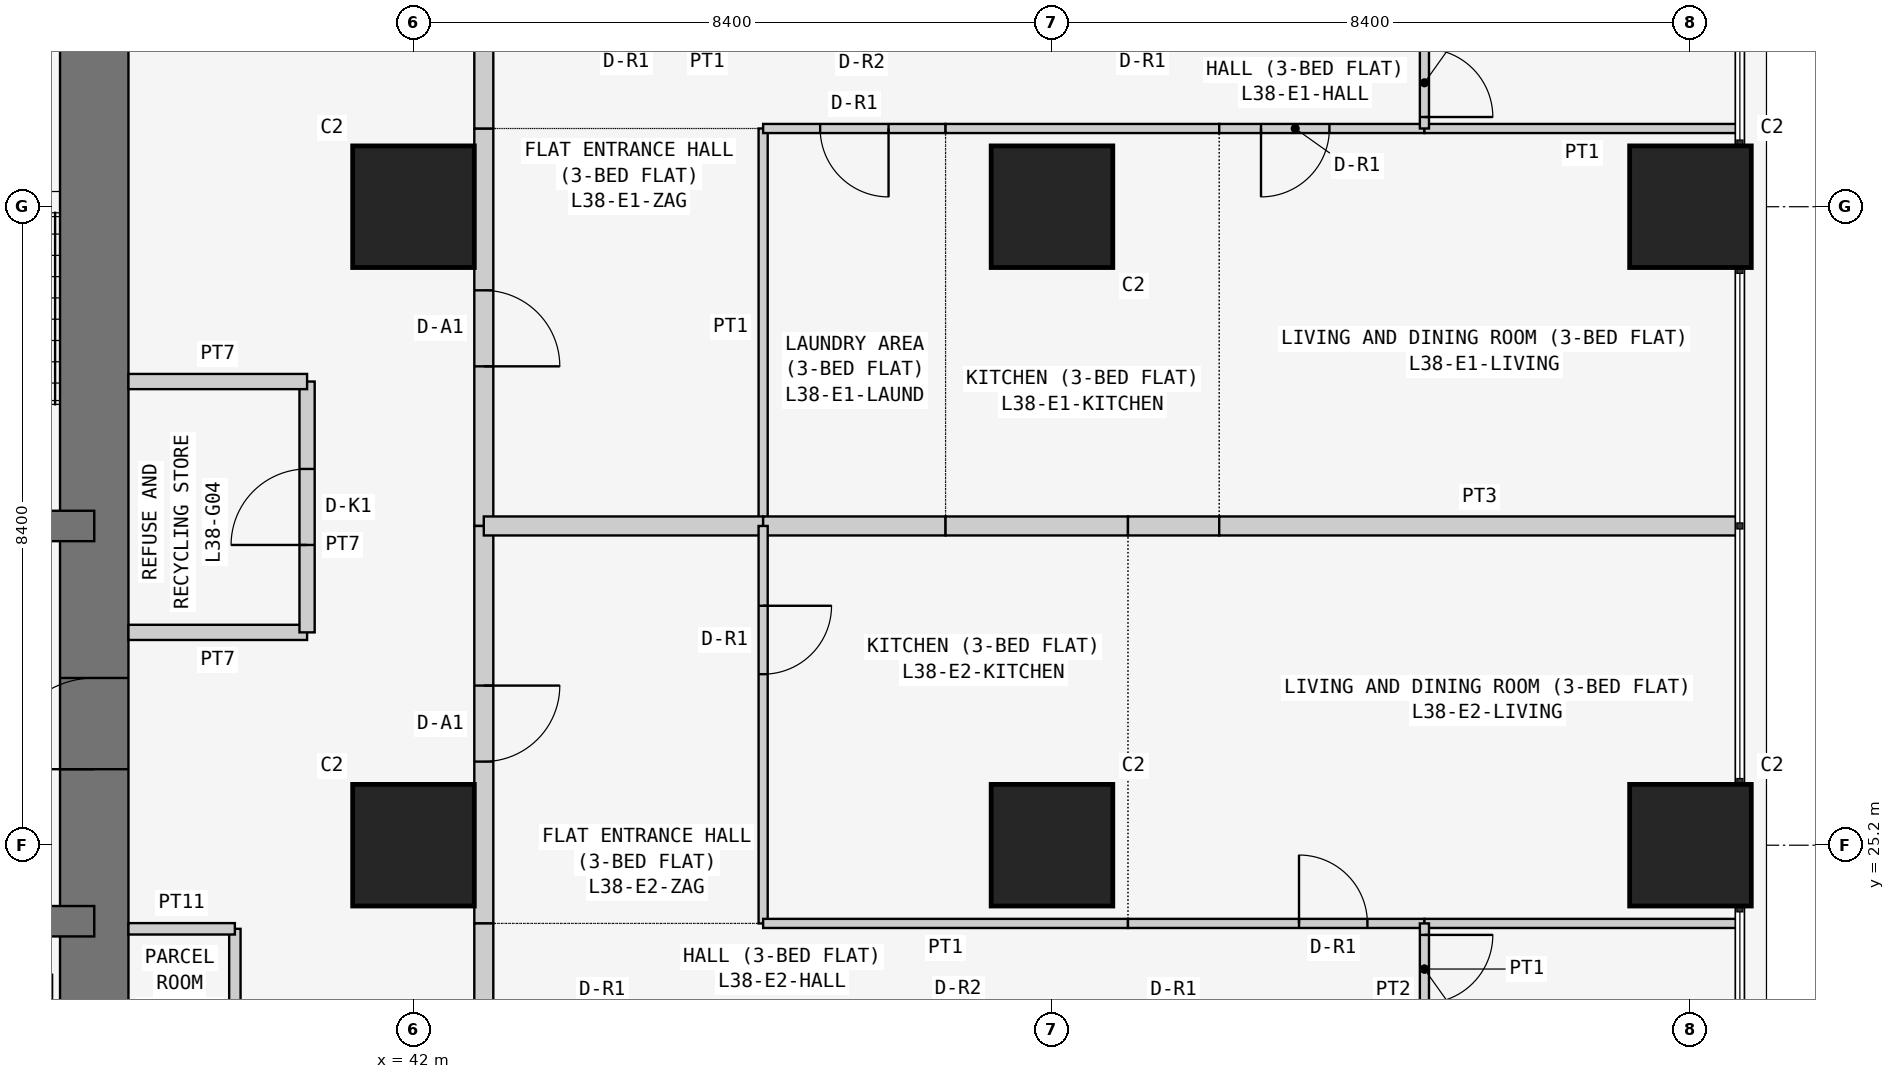
"""IFC4 building model, lengths in metres.
Left out: names, types, materials, properties, quantities, classifications, styles, units other than length and angle.
Written with IfcOpenShell. Run it as: python <this file> out.ifc"""

import sys

from ifc_helpers import new_model, si_unit, direction, frame, frame_2d, origin, origin_2d, place, context, subcontext, project, spatial, rectangle, extrude, element, fill, save


model = new_model("IFC4")
c1 = context("Model", 3, precision=1e-05, world=origin(), true_north=direction((0.0, 1.0)))
c2 = subcontext(c1, "Body", "Model", "MODEL_VIEW")
j1 = project(units=[si_unit("LENGTHUNIT", "METRE"), si_unit("PLANEANGLEUNIT", "RADIAN")], contexts=[c1])
p1 = place(None, origin())
s1 = spatial("IfcSite", under=j1, at=p1, CompositionType="ELEMENT")
p2 = place(p1, origin())
s2 = spatial("IfcBuilding", under=s1, at=p2, CompositionType="ELEMENT")
p3 = place(p2, frame((0.0, 0.0, 148.5)))
s3 = spatial("IfcBuildingStorey", under=s2, at=p3, CompositionType="ELEMENT", Elevation=148.5)
for number, where, z_axis, x_axis in (
    (1, (42.0, 25.2, 0.0), (0.0, 0.0, 1.0), (1.0, 0.0, 0.0)),
    (2, (42.0, 33.6, 0.0), (0.0, 0.0, 1.0), (1.0, 0.0, 0.0)),
    (3, (50.4, 25.2, 0.0), (0.0, 0.0, 1.0), (1.0, 0.0, 0.0)),
    (4, (50.4, 33.6, 0.0), (0.0, 0.0, 1.0), (1.0, 0.0, 0.0)),
    (5, (58.8, 25.2, 0.0), (0.0, 0.0, 1.0), (1.0, 0.0, 0.0)),
    (6, (58.8, 33.6, 0.0), (0.0, 0.0, 1.0), (1.0, 0.0, 0.0)),
):
    element("IfcColumn", number, at=place(p3, frame(where, z_axis=z_axis, x_axis=x_axis)), inside=s3, PredefinedType="COLUMN", context=c2, shape_type="SweptSolid", body=[
        extrude(rectangle(XDim=1.6, YDim=1.6, at=origin_2d()), origin(), (0.0, 0.0, 1.0), 3.6),
    ])
p4 = place(p3, frame((37.8, 21.0, 0.0), z_axis=(0.0, 0.0, 1.0), x_axis=(0.0, 1.0, 0.0)))
e7 = element("IfcWall", 7, at=p4, inside=s3, PredefinedType="SHEAR", context=c2, shape_type="SweptSolid", body=[
    extrude(rectangle(XDim=17.25, YDim=0.9, at=frame_2d((8.625, 0.0))), origin(), (0.0, 0.0, 1.0), 3.6),
])
p5 = place(p4, frame((5.2, 0.0, 0.0)))
e8 = element("IfcOpeningElement", 8, at=p5, cuts=e7, PredefinedType="OPENING", context=c2, shape_type="SweptSolid", body=[
    extrude(rectangle(XDim=1.2, YDim=2.1, at=frame_2d((0.6, 1.05))), frame((0.0, 0.46, 0.0), z_axis=(0.0, -1.0, 0.0), x_axis=(1.0, 0.0, 0.0)), (0.0, 0.0, 1.0), 0.92),
])
p6 = place(p3, frame((26.6, 24.2, 0.0), z_axis=(0.0, 0.0, 1.0), x_axis=(1.0, 0.0, 0.0)))
e9 = element("IfcWall", 9, at=p6, inside=s3, PredefinedType="SHEAR", context=c2, shape_type="SweptSolid", body=[
    extrude(rectangle(XDim=11.2, YDim=0.4, at=frame_2d((5.6, 0.0))), origin(), (0.0, 0.0, 1.0), 3.6),
])
p7 = place(p6, frame((0.85, 0.0, 0.0)))
e10 = element("IfcOpeningElement", 10, at=p7, cuts=e9, PredefinedType="OPENING", context=c2, shape_type="SweptSolid", body=[
    extrude(rectangle(XDim=1.1, YDim=2.1, at=frame_2d((0.55, 1.05))), frame((0.0, 0.21, 0.0), z_axis=(0.0, -1.0, 0.0), x_axis=(1.0, 0.0, 0.0)), (0.0, 0.0, 1.0), 0.42),
])
p8 = place(p6, frame((3.65, 0.0, 0.0)))
e11 = element("IfcOpeningElement", 11, at=p8, cuts=e9, PredefinedType="OPENING", context=c2, shape_type="SweptSolid", body=[
    extrude(rectangle(XDim=1.1, YDim=2.1, at=frame_2d((0.55, 1.05))), frame((0.0, 0.21, 0.0), z_axis=(0.0, -1.0, 0.0), x_axis=(1.0, 0.0, 0.0)), (0.0, 0.0, 1.0), 0.42),
])
p9 = place(p3, frame((32.2, 29.4, 0.0), z_axis=(0.0, 0.0, 1.0), x_axis=(1.0, 0.0, 0.0)))
e12 = element("IfcWall", 12, at=p9, inside=s3, PredefinedType="SHEAR", context=c2, shape_type="SweptSolid", body=[
    extrude(rectangle(XDim=5.6, YDim=0.4, at=frame_2d((2.8, 0.0))), origin(), (0.0, 0.0, 1.0), 3.6),
])
p10 = place(p9, frame((2.0, 0.0, 0.0)))
e13 = element("IfcOpeningElement", 13, at=p10, cuts=e12, PredefinedType="OPENING", context=c2, shape_type="SweptSolid", body=[
    extrude(rectangle(XDim=1.2, YDim=2.1, at=frame_2d((0.6, 1.05))), frame((0.0, 0.21, 0.0), z_axis=(0.0, -1.0, 0.0), x_axis=(1.0, 0.0, 0.0)), (0.0, 0.0, 1.0), 0.42),
])
p11 = place(p3, frame((39.65, 20.55, 0.0), z_axis=(0.0, 0.0, 1.0), x_axis=(0.0, 1.0, 0.0)))
e14 = element("IfcWall", 14, at=p11, inside=s3, PredefinedType="PARTITIONING", context=c2, shape_type="SweptSolid", body=[
    extrude(rectangle(XDim=3.55, YDim=0.15, at=frame_2d((1.775, 0.0))), origin(), (0.0, 0.0, 1.0), 3.45),
])
p12 = place(p11, frame((1.275, 0.0, 0.0)))
e15 = element("IfcOpeningElement", 15, at=p12, cuts=e14, PredefinedType="OPENING", context=c2, shape_type="SweptSolid", body=[
    extrude(rectangle(XDim=1.0, YDim=2.1, at=frame_2d((0.5, 1.05))), frame((0.0, 0.085, 0.0), z_axis=(0.0, -1.0, 0.0), x_axis=(1.0, 0.0, 0.0)), (0.0, 0.0, 1.0), 0.17),
])
p13 = place(p3, frame((39.65, 24.1, 0.0), z_axis=(0.0, 0.0, 1.0), x_axis=(-1.0, 0.0, 0.0)))
e16 = element("IfcWall", 16, at=p13, inside=s3, PredefinedType="PARTITIONING", context=c2, shape_type="SweptSolid", body=[
    extrude(rectangle(XDim=1.4, YDim=0.15, at=frame_2d((0.7, 0.0))), origin(), (0.0, 0.0, 1.0), 3.45),
])
p14 = place(p3, frame((38.25, 28.0, 0.0), z_axis=(0.0, 0.0, 1.0), x_axis=(1.0, 0.0, 0.0)))
e17 = element("IfcWall", 17, at=p14, inside=s3, PredefinedType="PARTITIONING", context=c2, shape_type="SweptSolid", body=[
    extrude(rectangle(XDim=2.35, YDim=0.2, at=frame_2d((1.175, 0.0))), origin(), (0.0, 0.0, 1.0), 3.45),
])
p15 = place(p3, frame((40.6, 28.0, 0.0), z_axis=(0.0, 0.0, 1.0), x_axis=(0.0, 1.0, 0.0)))
e18 = element("IfcWall", 18, at=p15, inside=s3, PredefinedType="PARTITIONING", context=c2, shape_type="SweptSolid", body=[
    extrude(rectangle(XDim=3.3, YDim=0.2, at=frame_2d((1.65, 0.0))), origin(), (0.0, 0.0, 1.0), 3.45),
])
p16 = place(p15, frame((1.15, 0.0, 0.0)))
e19 = element("IfcOpeningElement", 19, at=p16, cuts=e18, PredefinedType="OPENING", context=c2, shape_type="SweptSolid", body=[
    extrude(rectangle(XDim=1.0, YDim=2.1, at=frame_2d((0.5, 1.05))), frame((0.0, 0.11, 0.0), z_axis=(0.0, -1.0, 0.0), x_axis=(1.0, 0.0, 0.0)), (0.0, 0.0, 1.0), 0.22),
])
p17 = place(p3, frame((40.6, 31.3, 0.0), z_axis=(0.0, 0.0, 1.0), x_axis=(-1.0, 0.0, 0.0)))
e20 = element("IfcWall", 20, at=p17, inside=s3, PredefinedType="PARTITIONING", context=c2, shape_type="SweptSolid", body=[
    extrude(rectangle(XDim=2.35, YDim=0.2, at=frame_2d((1.175, 0.0))), origin(), (0.0, 0.0, 1.0), 3.45),
])
p18 = place(p3, frame((42.925, 34.629, 0.0), z_axis=(0.0, 0.0, 1.0), x_axis=(0.0, -1.0, 0.0)))
e21 = element("IfcWall", 21, at=p18, inside=s3, PredefinedType="PARTITIONING", context=c2, shape_type="SweptSolid", body=[
    extrude(rectangle(XDim=5.229, YDim=0.25, at=frame_2d((2.615, 0.0))), origin(), (0.0, 0.0, 1.0), 3.45),
])
p19 = place(p18, frame((2.129, 0.0, 0.0)))
e22 = element("IfcOpeningElement", 22, at=p19, cuts=e21, PredefinedType="OPENING", context=c2, shape_type="SweptSolid", body=[
    extrude(rectangle(XDim=1.0, YDim=2.1, at=frame_2d((0.5, 1.05))), frame((0.0, 0.135, 0.0), z_axis=(0.0, -1.0, 0.0), x_axis=(1.0, 0.0, 0.0)), (0.0, 0.0, 1.0), 0.27),
])
p20 = place(p3, frame((42.925, 35.829, 0.0), z_axis=(0.0, 0.0, 1.0), x_axis=(0.0, -1.0, 0.0)))
e23 = element("IfcWall", 23, at=p20, inside=s3, PredefinedType="PARTITIONING", context=c2, shape_type="SweptSolid", body=[
    extrude(rectangle(XDim=1.2, YDim=0.25, at=frame_2d((0.6, 0.0))), origin(), (0.0, 0.0, 1.0), 3.45),
])
p21 = place(p3, frame((42.925, 29.4, 0.0), z_axis=(0.0, 0.0, 1.0), x_axis=(0.0, -1.0, 0.0)))
e24 = element("IfcWall", 24, at=p21, inside=s3, PredefinedType="PARTITIONING", context=c2, shape_type="SweptSolid", body=[
    extrude(rectangle(XDim=5.229, YDim=0.25, at=frame_2d((2.615, 0.0))), origin(), (0.0, 0.0, 1.0), 3.45),
])
p22 = place(p21, frame((2.1, 0.0, 0.0)))
e25 = element("IfcOpeningElement", 25, at=p22, cuts=e24, PredefinedType="OPENING", context=c2, shape_type="SweptSolid", body=[
    extrude(rectangle(XDim=1.0, YDim=2.1, at=frame_2d((0.5, 1.05))), frame((0.0, 0.135, 0.0), z_axis=(0.0, -1.0, 0.0), x_axis=(1.0, 0.0, 0.0)), (0.0, 0.0, 1.0), 0.27),
])
p23 = place(p3, frame((42.925, 24.171, 0.0), z_axis=(0.0, 0.0, 1.0), x_axis=(0.0, -1.0, 0.0)))
e26 = element("IfcWall", 26, at=p23, inside=s3, PredefinedType="PARTITIONING", context=c2, shape_type="SweptSolid", body=[
    extrude(rectangle(XDim=1.2, YDim=0.25, at=frame_2d((0.6, 0.0))), origin(), (0.0, 0.0, 1.0), 3.45),
])
p24 = place(p3, frame((46.6, 29.4, 0.0), z_axis=(0.0, 0.0, 1.0), x_axis=(0.0, 1.0, 0.0)))
e27 = element("IfcWall", 27, at=p24, inside=s3, PredefinedType="PARTITIONING", context=c2, shape_type="SweptSolid", body=[
    extrude(rectangle(XDim=5.229, YDim=0.12, at=frame_2d((2.615, 0.0))), origin(), (0.0, 0.0, 1.0), 3.45),
])
p25 = place(p3, frame((42.925, 29.4, 0.0), z_axis=(0.0, 0.0, 1.0), x_axis=(1.0, 0.0, 0.0)))
e28 = element("IfcWall", 28, at=p25, inside=s3, PredefinedType="PARTITIONING", context=c2, shape_type="SweptSolid", body=[
    extrude(rectangle(XDim=3.675, YDim=0.25, at=frame_2d((1.837, 0.0))), origin(), (0.0, 0.0, 1.0), 3.45),
])
p26 = place(p3, frame((49.0, 34.629, 0.0), z_axis=(0.0, 0.0, 1.0), x_axis=(-1.0, 0.0, 0.0)))
e29 = element("IfcWall", 29, at=p26, inside=s3, PredefinedType="PARTITIONING", context=c2, shape_type="SweptSolid", body=[
    extrude(rectangle(XDim=2.4, YDim=0.12, at=frame_2d((1.2, 0.0))), origin(), (0.0, 0.0, 1.0), 3.45),
])
p27 = place(p26, frame((0.75, 0.0, 0.0)))
e30 = element("IfcOpeningElement", 30, at=p27, cuts=e29, PredefinedType="OPENING", context=c2, shape_type="SweptSolid", body=[
    extrude(rectangle(XDim=0.9, YDim=2.1, at=frame_2d((0.45, 1.05))), frame((0.0, 0.07, 0.0), z_axis=(0.0, -1.0, 0.0), x_axis=(1.0, 0.0, 0.0)), (0.0, 0.0, 1.0), 0.14),
])
p28 = place(p3, frame((46.6, 29.4, 0.0), z_axis=(0.0, 0.0, 1.0), x_axis=(1.0, 0.0, 0.0)))
e31 = element("IfcWall", 31, at=p28, inside=s3, PredefinedType="PARTITIONING", context=c2, shape_type="SweptSolid", body=[
    extrude(rectangle(XDim=2.4, YDim=0.25, at=frame_2d((1.2, 0.0))), origin(), (0.0, 0.0, 1.0), 3.45),
])
p29 = place(p3, frame((52.6, 34.629, 0.0), z_axis=(0.0, 0.0, 1.0), x_axis=(-1.0, 0.0, 0.0)))
e32 = element("IfcWall", 32, at=p29, inside=s3, PredefinedType="PARTITIONING", context=c2, shape_type="SweptSolid", body=[
    extrude(rectangle(XDim=3.6, YDim=0.12, at=frame_2d((1.8, 0.0))), origin(), (0.0, 0.0, 1.0), 3.45),
])
p30 = place(p3, frame((49.0, 29.4, 0.0), z_axis=(0.0, 0.0, 1.0), x_axis=(1.0, 0.0, 0.0)))
e33 = element("IfcWall", 33, at=p30, inside=s3, PredefinedType="PARTITIONING", context=c2, shape_type="SweptSolid", body=[
    extrude(rectangle(XDim=2.4, YDim=0.25, at=frame_2d((1.2, 0.0))), origin(), (0.0, 0.0, 1.0), 3.45),
])
p31 = place(p3, frame((51.4, 29.4, 0.0), z_axis=(0.0, 0.0, 1.0), x_axis=(1.0, 0.0, 0.0)))
e34 = element("IfcWall", 34, at=p31, inside=s3, PredefinedType="PARTITIONING", context=c2, shape_type="SweptSolid", body=[
    extrude(rectangle(XDim=1.2, YDim=0.25, at=frame_2d((0.6, 0.0))), origin(), (0.0, 0.0, 1.0), 3.45),
])
p32 = place(p3, frame((55.3, 34.629, 0.0), z_axis=(0.0, 0.0, 1.0), x_axis=(-1.0, 0.0, 0.0)))
e35 = element("IfcWall", 35, at=p32, inside=s3, PredefinedType="PARTITIONING", context=c2, shape_type="SweptSolid", body=[
    extrude(rectangle(XDim=2.7, YDim=0.12, at=frame_2d((1.35, 0.0))), origin(), (0.0, 0.0, 1.0), 3.45),
])
p33 = place(p32, frame((1.25, 0.0, 0.0)))
e36 = element("IfcOpeningElement", 36, at=p33, cuts=e35, PredefinedType="OPENING", context=c2, shape_type="SweptSolid", body=[
    extrude(rectangle(XDim=0.9, YDim=2.1, at=frame_2d((0.45, 1.05))), frame((0.0, 0.07, 0.0), z_axis=(0.0, -1.0, 0.0), x_axis=(1.0, 0.0, 0.0)), (0.0, 0.0, 1.0), 0.14),
])
p34 = place(p3, frame((59.45, 34.629, 0.0), z_axis=(0.0, 0.0, 1.0), x_axis=(-1.0, 0.0, 0.0)))
e37 = element("IfcWall", 37, at=p34, inside=s3, PredefinedType="PARTITIONING", context=c2, shape_type="SweptSolid", body=[
    extrude(rectangle(XDim=4.15, YDim=0.12, at=frame_2d((2.075, 0.0))), origin(), (0.0, 0.0, 1.0), 3.45),
])
p35 = place(p3, frame((52.6, 29.4, 0.0), z_axis=(0.0, 0.0, 1.0), x_axis=(1.0, 0.0, 0.0)))
e38 = element("IfcWall", 38, at=p35, inside=s3, PredefinedType="PARTITIONING", context=c2, shape_type="SweptSolid", body=[
    extrude(rectangle(XDim=6.85, YDim=0.25, at=frame_2d((3.425, 0.0))), origin(), (0.0, 0.0, 1.0), 3.45),
])
p36 = place(p3, frame((55.3, 34.629, 0.0), z_axis=(0.0, 0.0, 1.0), x_axis=(0.0, 1.0, 0.0)))
e39 = element("IfcWall", 39, at=p36, inside=s3, PredefinedType="PARTITIONING", context=c2, shape_type="SweptSolid", body=[
    extrude(rectangle(XDim=1.2, YDim=0.12, at=frame_2d((0.6, 0.0))), origin(), (0.0, 0.0, 1.0), 3.45),
])
p37 = place(p36, frame((0.151, 0.0, 0.0)))
e40 = element("IfcOpeningElement", 40, at=p37, cuts=e39, PredefinedType="OPENING", context=c2, shape_type="SweptSolid", body=[
    extrude(rectangle(XDim=0.9, YDim=2.1, at=frame_2d((0.45, 1.05))), frame((0.0, 0.07, 0.0), z_axis=(0.0, -1.0, 0.0), x_axis=(1.0, 0.0, 0.0)), (0.0, 0.0, 1.0), 0.14),
])
p38 = place(p3, frame((46.6, 29.4, 0.0), z_axis=(0.0, 0.0, 1.0), x_axis=(0.0, -1.0, 0.0)))
e41 = element("IfcWall", 41, at=p38, inside=s3, PredefinedType="PARTITIONING", context=c2, shape_type="SweptSolid", body=[
    extrude(rectangle(XDim=5.229, YDim=0.12, at=frame_2d((2.615, 0.0))), origin(), (0.0, 0.0, 1.0), 3.45),
])
p39 = place(p38, frame((1.05, 0.0, 0.0)))
e42 = element("IfcOpeningElement", 42, at=p39, cuts=e41, PredefinedType="OPENING", context=c2, shape_type="SweptSolid", body=[
    extrude(rectangle(XDim=0.9, YDim=2.1, at=frame_2d((0.45, 1.05))), frame((0.0, 0.07, 0.0), z_axis=(0.0, -1.0, 0.0), x_axis=(1.0, 0.0, 0.0)), (0.0, 0.0, 1.0), 0.14),
])
p40 = place(p3, frame((51.4, 24.171, 0.0), z_axis=(0.0, 0.0, 1.0), x_axis=(-1.0, 0.0, 0.0)))
e43 = element("IfcWall", 43, at=p40, inside=s3, PredefinedType="PARTITIONING", context=c2, shape_type="SweptSolid", body=[
    extrude(rectangle(XDim=4.8, YDim=0.12, at=frame_2d((2.4, 0.0))), origin(), (0.0, 0.0, 1.0), 3.45),
])
p41 = place(p3, frame((55.3, 24.171, 0.0), z_axis=(0.0, 0.0, 1.0), x_axis=(-1.0, 0.0, 0.0)))
e44 = element("IfcWall", 44, at=p41, inside=s3, PredefinedType="PARTITIONING", context=c2, shape_type="SweptSolid", body=[
    extrude(rectangle(XDim=3.9, YDim=0.12, at=frame_2d((1.95, 0.0))), origin(), (0.0, 0.0, 1.0), 3.45),
])
p42 = place(p41, frame((0.75, 0.0, 0.0)))
e45 = element("IfcOpeningElement", 45, at=p42, cuts=e44, PredefinedType="OPENING", context=c2, shape_type="SweptSolid", body=[
    extrude(rectangle(XDim=0.9, YDim=2.1, at=frame_2d((0.45, 1.05))), frame((0.0, 0.07, 0.0), z_axis=(0.0, -1.0, 0.0), x_axis=(1.0, 0.0, 0.0)), (0.0, 0.0, 1.0), 0.14),
])
p43 = place(p3, frame((59.45, 24.171, 0.0), z_axis=(0.0, 0.0, 1.0), x_axis=(-1.0, 0.0, 0.0)))
e46 = element("IfcWall", 46, at=p43, inside=s3, PredefinedType="PARTITIONING", context=c2, shape_type="SweptSolid", body=[
    extrude(rectangle(XDim=4.15, YDim=0.12, at=frame_2d((2.075, 0.0))), origin(), (0.0, 0.0, 1.0), 3.45),
])
p44 = place(p3, frame((55.3, 24.171, 0.0), z_axis=(0.0, 0.0, 1.0), x_axis=(0.0, -1.0, 0.0)))
e47 = element("IfcWall", 47, at=p44, inside=s3, PredefinedType="PARTITIONING", context=c2, shape_type="SweptSolid", body=[
    extrude(rectangle(XDim=1.2, YDim=0.12, at=frame_2d((0.6, 0.0))), origin(), (0.0, 0.0, 1.0), 3.45),
])
p45 = place(p44, frame((0.151, 0.0, 0.0)))
e48 = element("IfcOpeningElement", 48, at=p45, cuts=e47, PredefinedType="OPENING", context=c2, shape_type="SweptSolid", body=[
    extrude(rectangle(XDim=0.9, YDim=2.1, at=frame_2d((0.45, 1.05))), frame((0.0, 0.07, 0.0), z_axis=(0.0, -1.0, 0.0), x_axis=(1.0, 0.0, 0.0)), (0.0, 0.0, 1.0), 0.14),
])
p46 = place(p16, origin())
e49 = element("IfcDoor", 49, at=p46, inside=s3, OperationType="SINGLE_SWING_LEFT", PredefinedType="DOOR", context=c2, shape_type="SweptSolid", body=[
    extrude(rectangle(XDim=1.0, YDim=2.1, at=frame_2d((0.5, 1.05))), frame((0.0, 0.025, 0.0), z_axis=(0.0, -1.0, 0.0), x_axis=(1.0, 0.0, 0.0)), (0.0, 0.0, 1.0), 0.05),
])
fill(e19, e49)
p47 = place(p19, origin())
e50 = element("IfcDoor", 50, at=p47, inside=s3, OperationType="SINGLE_SWING_RIGHT", PredefinedType="DOOR", context=c2, shape_type="SweptSolid", body=[
    extrude(rectangle(XDim=1.0, YDim=2.1, at=frame_2d((0.5, 1.05))), frame((0.0, 0.025, 0.0), z_axis=(0.0, -1.0, 0.0), x_axis=(1.0, 0.0, 0.0)), (0.0, 0.0, 1.0), 0.05),
])
fill(e22, e50)
p48 = place(p27, origin())
e51 = element("IfcDoor", 51, at=p48, inside=s3, OperationType="SINGLE_SWING_LEFT", PredefinedType="DOOR", context=c2, shape_type="SweptSolid", body=[
    extrude(rectangle(XDim=0.9, YDim=2.1, at=frame_2d((0.45, 1.05))), frame((0.0, 0.025, 0.0), z_axis=(0.0, -1.0, 0.0), x_axis=(1.0, 0.0, 0.0)), (0.0, 0.0, 1.0), 0.05),
])
fill(e30, e51)
p49 = place(p33, origin())
e52 = element("IfcDoor", 52, at=p49, inside=s3, OperationType="SINGLE_SWING_RIGHT", PredefinedType="DOOR", context=c2, shape_type="SweptSolid", body=[
    extrude(rectangle(XDim=0.9, YDim=2.1, at=frame_2d((0.45, 1.05))), frame((0.0, 0.025, 0.0), z_axis=(0.0, -1.0, 0.0), x_axis=(1.0, 0.0, 0.0)), (0.0, 0.0, 1.0), 0.05),
])
fill(e36, e52)
p50 = place(p37, frame((0.9, 0.0, 0.0), z_axis=(0.0, 0.0, 1.0), x_axis=(-1.0, 0.0, 0.0)))
e53 = element("IfcDoor", 53, at=p50, inside=s3, OperationType="SINGLE_SWING_RIGHT", PredefinedType="DOOR", context=c2, shape_type="SweptSolid", body=[
    extrude(rectangle(XDim=0.9, YDim=2.1, at=frame_2d((0.45, 1.05))), frame((0.0, 0.025, 0.0), z_axis=(0.0, -1.0, 0.0), x_axis=(1.0, 0.0, 0.0)), (0.0, 0.0, 1.0), 0.05),
])
fill(e40, e53)
p51 = place(p22, origin())
e54 = element("IfcDoor", 54, at=p51, inside=s3, OperationType="SINGLE_SWING_LEFT", PredefinedType="DOOR", context=c2, shape_type="SweptSolid", body=[
    extrude(rectangle(XDim=1.0, YDim=2.1, at=frame_2d((0.5, 1.05))), frame((0.0, 0.025, 0.0), z_axis=(0.0, -1.0, 0.0), x_axis=(1.0, 0.0, 0.0)), (0.0, 0.0, 1.0), 0.05),
])
fill(e25, e54)
p52 = place(p39, origin())
e55 = element("IfcDoor", 55, at=p52, inside=s3, OperationType="SINGLE_SWING_LEFT", PredefinedType="DOOR", context=c2, shape_type="SweptSolid", body=[
    extrude(rectangle(XDim=0.9, YDim=2.1, at=frame_2d((0.45, 1.05))), frame((0.0, 0.025, 0.0), z_axis=(0.0, -1.0, 0.0), x_axis=(1.0, 0.0, 0.0)), (0.0, 0.0, 1.0), 0.05),
])
fill(e42, e55)
p53 = place(p42, frame((0.9, 0.0, 0.0), z_axis=(0.0, 0.0, 1.0), x_axis=(-1.0, 0.0, 0.0)))
e56 = element("IfcDoor", 56, at=p53, inside=s3, OperationType="SINGLE_SWING_LEFT", PredefinedType="DOOR", context=c2, shape_type="SweptSolid", body=[
    extrude(rectangle(XDim=0.9, YDim=2.1, at=frame_2d((0.45, 1.05))), frame((0.0, 0.025, 0.0), z_axis=(0.0, -1.0, 0.0), x_axis=(1.0, 0.0, 0.0)), (0.0, 0.0, 1.0), 0.05),
])
fill(e45, e56)
p54 = place(p45, origin())
e57 = element("IfcDoor", 57, at=p54, inside=s3, OperationType="SINGLE_SWING_LEFT", PredefinedType="DOOR", context=c2, shape_type="SweptSolid", body=[
    extrude(rectangle(XDim=0.9, YDim=2.1, at=frame_2d((0.45, 1.05))), frame((0.0, 0.025, 0.0), z_axis=(0.0, -1.0, 0.0), x_axis=(1.0, 0.0, 0.0)), (0.0, 0.0, 1.0), 0.05),
])
fill(e48, e57)
p55 = place(p5, origin())
e58 = element("IfcDoor", 58, at=p55, inside=s3, OperationType="SINGLE_SWING_LEFT", PredefinedType="DOOR", context=c2, shape_type="SweptSolid", body=[
    extrude(rectangle(XDim=1.2, YDim=2.1, at=frame_2d((0.6, 1.05))), frame((0.0, 0.025, 0.0), z_axis=(0.0, -1.0, 0.0), x_axis=(1.0, 0.0, 0.0)), (0.0, 0.0, 1.0), 0.05),
])
fill(e8, e58)
save(model, sys.argv[1])
